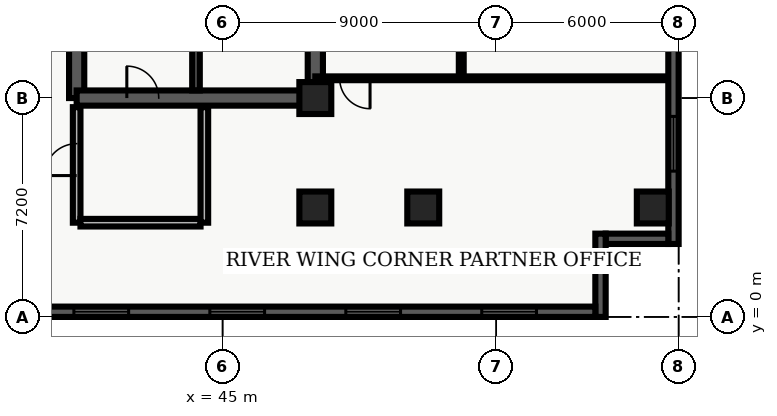
"""IFC4 building model, lengths in metres.
Left out: names, types, materials, properties, quantities, classifications, styles, units other than length and angle.
Written with IfcOpenShell. Run it as: python <this file> out.ifc"""

import sys

from ifc_helpers import new_model, entity, si_unit, converted_unit, direction, frame, origin_with_axes, origin_2d_with_axis, place, context, subcontext, project, spatial, polyline, rectangle, outline, extrude, element, fill, save


model = new_model("IFC4")
c1 = context("Model", 3, precision=1e-05, world=origin_with_axes(), true_north=direction((0.0, 1.0)))
c2 = subcontext(c1, "Body", "Model", "MODEL_VIEW")
j1 = project(units=[si_unit("LENGTHUNIT", "METRE"), converted_unit("PLANEANGLEUNIT", "DEGREE", entity("IfcPlaneAngleMeasure", 0.017), si_unit("PLANEANGLEUNIT", "RADIAN"), dimensions=[0, 0, 0, 0, 0, 0, 0])], contexts=[c1])
p1 = place(None, origin_with_axes())
s1 = spatial("IfcSite", under=j1, at=p1, CompositionType="ELEMENT")
p2 = place(p1, origin_with_axes())
s2 = spatial("IfcBuilding", under=s1, at=p2, CompositionType="ELEMENT")
p3 = place(p2, frame((0.0, 0.0, 179.7), z_axis=(0.0, 0.0, 1.0), x_axis=(1.0, 0.0, 0.0)))
s3 = spatial("IfcBuildingStorey", under=s2, at=p3, CompositionType="ELEMENT", Elevation=179.7)
p4 = place(p3, frame((40.2, 7.2, 0.0), z_axis=(0.0, 0.0, 1.0), x_axis=(0.0, 1.0, 0.0)))
e1 = element("IfcWall", 1, at=p4, inside=s3, PredefinedType="SHEAR", context=c2, shape_type="SweptSolid", body=[
    extrude(outline(polyline([(0.0, -0.25), (15.6, -0.25), (15.6, 0.25), (0.0, 0.25), (0.0, -0.25)])), origin_with_axes(), (0.0, 0.0, 1.0), 3.66),
])
p5 = place(p4, frame((14.475, 0.0, 0.0), z_axis=(0.0, 0.0, 1.0), x_axis=(1.0, 0.0, 0.0)))
e2 = element("IfcOpeningElement", 2, at=p5, cuts=e1, PredefinedType="OPENING", context=c2, shape_type="SweptSolid", body=[
    extrude(rectangle(XDim=1.05, YDim=0.52, at=origin_2d_with_axis()), origin_with_axes(), (0.0, 0.0, 1.0), 2.15),
])
p6 = place(p4, frame((12.75, 0.0, 0.0), z_axis=(0.0, 0.0, 1.0), x_axis=(1.0, 0.0, 0.0)))
e3 = element("IfcOpeningElement", 3, at=p6, cuts=e1, PredefinedType="OPENING", context=c2, shape_type="SweptSolid", body=[
    extrude(rectangle(XDim=1.2, YDim=0.52, at=origin_2d_with_axis()), origin_with_axes(), (0.0, 0.0, 1.0), 2.15),
])
p7 = place(p4, frame((9.3, 0.0, 0.0), z_axis=(0.0, 0.0, 1.0), x_axis=(1.0, 0.0, 0.0)))
e4 = element("IfcOpeningElement", 4, at=p7, cuts=e1, PredefinedType="OPENING", context=c2, shape_type="SweptSolid", body=[
    extrude(rectangle(XDim=0.9, YDim=0.52, at=origin_2d_with_axis()), origin_with_axes(), (0.0, 0.0, 1.0), 2.15),
])
p8 = place(p3, frame((40.2, 7.2, 0.0), z_axis=(0.0, 0.0, 1.0), x_axis=(1.0, 0.0, 0.0)))
e5 = element("IfcWall", 5, at=p8, inside=s3, PredefinedType="SHEAR", context=c2, shape_type="SweptSolid", body=[
    extrude(outline(polyline([(0.0, -0.25), (7.85, -0.25), (7.85, 0.25), (0.0, 0.25), (0.0, -0.25)])), origin_with_axes(), (0.0, 0.0, 1.0), 3.66),
])
p9 = place(p8, frame((2.175, 0.0, 0.0), z_axis=(0.0, 0.0, 1.0), x_axis=(1.0, 0.0, 0.0)))
e6 = element("IfcOpeningElement", 6, at=p9, cuts=e5, PredefinedType="OPENING", context=c2, shape_type="SweptSolid", body=[
    extrude(rectangle(XDim=1.05, YDim=0.52, at=origin_2d_with_axis()), origin_with_axes(), (0.0, 0.0, 1.0), 2.15),
])
p10 = place(p3, frame((48.05, 7.2, 0.0), z_axis=(0.0, 0.0, 1.0), x_axis=(0.0, 1.0, 0.0)))
e7 = element("IfcWall", 7, at=p10, inside=s3, PredefinedType="SHEAR", context=c2, shape_type="SweptSolid", body=[
    extrude(outline(polyline([(0.0, -0.25), (15.6, -0.25), (15.6, 0.25), (0.0, 0.25), (0.0, -0.25)])), origin_with_axes(), (0.0, 0.0, 1.0), 3.66),
])
p11 = place(p10, frame((5.975, 0.0, 0.0), z_axis=(0.0, 0.0, 1.0), x_axis=(1.0, 0.0, 0.0)))
e8 = element("IfcOpeningElement", 8, at=p11, cuts=e7, PredefinedType="OPENING", context=c2, shape_type="SweptSolid", body=[
    extrude(rectangle(XDim=1.05, YDim=0.52, at=origin_2d_with_axis()), origin_with_axes(), (0.0, 0.0, 1.0), 2.15),
])
p12 = place(p10, frame((2.725, 0.0, 0.0), z_axis=(0.0, 0.0, 1.0), x_axis=(1.0, 0.0, 0.0)))
e9 = element("IfcOpeningElement", 9, at=p12, cuts=e7, PredefinedType="OPENING", context=c2, shape_type="SweptSolid", body=[
    extrude(rectangle(XDim=0.95, YDim=0.52, at=origin_2d_with_axis()), origin_with_axes(), (0.0, 0.0, 1.0), 2.15),
])
p13 = place(p3, frame((44.125, 7.45, 0.0), z_axis=(0.0, 0.0, 1.0), x_axis=(0.0, 1.0, 0.0)))
e10 = element("IfcWall", 10, at=p13, inside=s3, PredefinedType="SHEAR", context=c2, shape_type="SweptSolid", body=[
    extrude(outline(polyline([(0.0, -0.125), (15.1, -0.125), (15.1, 0.125), (0.0, 0.125), (0.0, -0.125)])), origin_with_axes(), (0.0, 0.0, 1.0), 3.66),
])
p14 = place(p3, frame((40.2, 3.1, 0.0), z_axis=(0.0, 0.0, 1.0), x_axis=(0.0, 1.0, 0.0)))
e11 = element("IfcWall", 11, at=p14, inside=s3, PredefinedType="SOLIDWALL", context=c2, shape_type="SweptSolid", body=[
    extrude(outline(polyline([(0.0, -0.125), (3.8, -0.125), (3.8, 0.125), (0.0, 0.125), (0.0, -0.125)])), origin_with_axes(), (0.0, 0.0, 1.0), 2.7),
])
p15 = place(p14, frame((2.075, 0.0, 0.0), z_axis=(0.0, 0.0, 1.0), x_axis=(1.0, 0.0, 0.0)))
e12 = element("IfcOpeningElement", 12, at=p15, cuts=e11, PredefinedType="OPENING", context=c2, shape_type="SweptSolid", body=[
    extrude(rectangle(XDim=1.05, YDim=0.27, at=origin_2d_with_axis()), origin_with_axes(), (0.0, 0.0, 1.0), 2.15),
])
p16 = place(p3, frame((40.325, 3.1, 0.0), z_axis=(0.0, 0.0, 1.0), x_axis=(1.0, 0.0, 0.0)))
e13 = element("IfcWall", 13, at=p16, inside=s3, PredefinedType="SOLIDWALL", context=c2, shape_type="SweptSolid", body=[
    extrude(outline(polyline([(0.0, -0.125), (3.95, -0.125), (3.95, 0.125), (0.0, 0.125), (0.0, -0.125)])), origin_with_axes(), (0.0, 0.0, 1.0), 2.7),
])
p17 = place(p3, frame((44.4, 3.1, 0.0), z_axis=(0.0, 0.0, 1.0), x_axis=(0.0, 1.0, 0.0)))
e14 = element("IfcWall", 14, at=p17, inside=s3, PredefinedType="SOLIDWALL", context=c2, shape_type="SweptSolid", body=[
    extrude(outline(polyline([(0.0, -0.125), (3.8, -0.125), (3.8, 0.125), (0.0, 0.125), (0.0, -0.125)])), origin_with_axes(), (0.0, 0.0, 1.0), 2.7),
])
for number, where, z_axis, x_axis in (
    (15, (48.05, 3.6, 0.0), (0.0, 0.0, 1.0), (1.0, 0.0, 0.0)),
    (16, (48.05, 7.2, 0.0), (0.0, 0.0, 1.0), (1.0, 0.0, 0.0)),
    (17, (51.6, 3.6, 0.0), (0.0, 0.0, 1.0), (1.0, 0.0, 0.0)),
    (18, (59.15, 3.6, 0.0), (0.0, 0.0, 1.0), (1.0, 0.0, 0.0)),
):
    element("IfcColumn", number, at=place(p3, frame(where, z_axis=z_axis, x_axis=x_axis)), inside=s3, PredefinedType="COLUMN", context=c2, shape_type="SweptSolid", body=[
        extrude(rectangle(XDim=1.05, YDim=1.05, at=origin_2d_with_axis()), origin_with_axes(), (0.0, 0.0, 1.0), 3.9),
    ])
p18 = place(p3, frame((52.85, 7.85, 0.0), z_axis=(0.0, 0.0, 1.0), x_axis=(0.0, 1.0, 0.0)))
e19 = element("IfcWall", 19, at=p18, inside=s3, PredefinedType="PARTITIONING", context=c2, shape_type="SweptSolid", body=[
    extrude(outline(polyline([(0.0, -0.08), (18.8, -0.08), (18.8, 0.08), (0.0, 0.08), (0.0, -0.08)])), origin_with_axes(), (0.0, 0.0, 1.0), 2.7),
])
p19 = place(p18, frame((4.485, 0.0, 0.0), z_axis=(0.0, 0.0, 1.0), x_axis=(1.0, 0.0, 0.0)))
e20 = element("IfcOpeningElement", 20, at=p19, cuts=e19, PredefinedType="OPENING", context=c2, shape_type="SweptSolid", body=[
    extrude(rectangle(XDim=1.0, YDim=0.18, at=origin_2d_with_axis()), origin_with_axes(), (0.0, 0.0, 1.0), 2.15),
])
p20 = place(p18, frame((7.897, 0.0, 0.0), z_axis=(0.0, 0.0, 1.0), x_axis=(1.0, 0.0, 0.0)))
e21 = element("IfcOpeningElement", 21, at=p20, cuts=e19, PredefinedType="OPENING", context=c2, shape_type="SweptSolid", body=[
    extrude(rectangle(XDim=1.0, YDim=0.18, at=origin_2d_with_axis()), origin_with_axes(), (0.0, 0.0, 1.0), 2.15),
])
p21 = place(p18, frame((11.964, 0.0, 0.0), z_axis=(0.0, 0.0, 1.0), x_axis=(1.0, 0.0, 0.0)))
e22 = element("IfcOpeningElement", 22, at=p21, cuts=e19, PredefinedType="OPENING", context=c2, shape_type="SweptSolid", body=[
    extrude(rectangle(XDim=1.0, YDim=0.18, at=origin_2d_with_axis()), origin_with_axes(), (0.0, 0.0, 1.0), 2.15),
])
p22 = place(p18, frame((18.011, 0.0, 0.0), z_axis=(0.0, 0.0, 1.0), x_axis=(1.0, 0.0, 0.0)))
e23 = element("IfcOpeningElement", 23, at=p22, cuts=e19, PredefinedType="OPENING", context=c2, shape_type="SweptSolid", body=[
    extrude(rectangle(XDim=1.0, YDim=0.18, at=origin_2d_with_axis()), origin_with_axes(), (0.0, 0.0, 1.0), 2.15),
])
p23 = place(p3, frame((59.665, 7.85, 0.0), z_axis=(0.0, 0.0, 1.0), x_axis=(-1.0, 0.0, 0.0)))
e24 = element("IfcWall", 24, at=p23, inside=s3, PredefinedType="PARTITIONING", context=c2, shape_type="SweptSolid", body=[
    extrude(outline(polyline([(0.0, -0.062), (11.615, -0.062), (11.615, 0.062), (0.0, 0.062), (0.0, -0.062)])), origin_with_axes(), (0.0, 0.0, 1.0), 2.7),
])
p24 = place(p23, frame((10.315, 0.0, 0.0), z_axis=(0.0, 0.0, 1.0), x_axis=(1.0, 0.0, 0.0)))
e25 = element("IfcOpeningElement", 25, at=p24, cuts=e24, PredefinedType="OPENING", context=c2, shape_type="SweptSolid", body=[
    extrude(rectangle(XDim=1.0, YDim=0.145, at=origin_2d_with_axis()), origin_with_axes(), (0.0, 0.0, 1.0), 2.15),
])
p25 = place(p3, frame((59.83, 26.06, 0.0), z_axis=(0.0, 0.0, 1.0), x_axis=(0.0, -1.0, 0.0)))
e26 = element("IfcWall", 26, at=p25, inside=s3, PredefinedType="SOLIDWALL", context=c2, shape_type="SweptSolid", body=[
    extrude(outline(polyline([(0.0, -0.17), (23.66, -0.17), (23.66, 0.17), (0.0, 0.17), (0.0, -0.17)])), origin_with_axes(), (0.0, 0.0, 1.0), 3.66),
])
p26 = place(p25, frame((20.364, 0.0, 0.45), z_axis=(0.0, 0.0, 1.0), x_axis=(1.0, 0.0, 0.0)))
e27 = element("IfcOpeningElement", 27, at=p26, cuts=e26, PredefinedType="OPENING", context=c2, shape_type="SweptSolid", body=[
    extrude(rectangle(XDim=1.8, YDim=0.36, at=origin_2d_with_axis()), origin_with_axes(), (0.0, 0.0, 1.0), 2.1),
])
p27 = place(p3, frame((59.66, 2.57, 0.0), z_axis=(0.0, 0.0, 1.0), x_axis=(-1.0, 0.0, 0.0)))
e28 = element("IfcWall", 28, at=p27, inside=s3, PredefinedType="SOLIDWALL", context=c2, shape_type="SweptSolid", body=[
    extrude(outline(polyline([(0.0, -0.17), (2.06, -0.17), (2.06, 0.17), (0.0, 0.17), (0.0, -0.17)])), origin_with_axes(), (0.0, 0.0, 1.0), 3.66),
])
p28 = place(p3, frame((57.43, 2.74, 0.0), z_axis=(0.0, 0.0, 1.0), x_axis=(0.0, -1.0, 0.0)))
e29 = element("IfcWall", 29, at=p28, inside=s3, PredefinedType="SOLIDWALL", context=c2, shape_type="SweptSolid", body=[
    extrude(outline(polyline([(0.0, -0.17), (2.74, -0.17), (2.74, 0.17), (0.0, 0.17), (0.0, -0.17)])), origin_with_axes(), (0.0, 0.0, 1.0), 3.66),
])
p29 = place(p3, frame((57.26, 0.17, 0.0), z_axis=(0.0, 0.0, 1.0), x_axis=(-1.0, 0.0, 0.0)))
e30 = element("IfcWall", 30, at=p29, inside=s3, PredefinedType="SOLIDWALL", context=c2, shape_type="SweptSolid", body=[
    extrude(outline(polyline([(0.0, -0.17), (54.86, -0.17), (54.86, 0.17), (0.0, 0.17), (0.0, -0.17)])), origin_with_axes(), (0.0, 0.0, 1.0), 3.66),
])
p30 = place(p29, frame((2.836, 0.0, 0.45), z_axis=(0.0, 0.0, 1.0), x_axis=(1.0, 0.0, 0.0)))
e31 = element("IfcOpeningElement", 31, at=p30, cuts=e30, PredefinedType="OPENING", context=c2, shape_type="SweptSolid", body=[
    extrude(rectangle(XDim=1.8, YDim=0.36, at=origin_2d_with_axis()), origin_with_axes(), (0.0, 0.0, 1.0), 2.1),
])
p31 = place(p29, frame((7.307, 0.0, 0.45), z_axis=(0.0, 0.0, 1.0), x_axis=(1.0, 0.0, 0.0)))
e32 = element("IfcOpeningElement", 32, at=p31, cuts=e30, PredefinedType="OPENING", context=c2, shape_type="SweptSolid", body=[
    extrude(rectangle(XDim=1.8, YDim=0.36, at=origin_2d_with_axis()), origin_with_axes(), (0.0, 0.0, 1.0), 2.1),
])
p32 = place(p29, frame((11.779, 0.0, 0.45), z_axis=(0.0, 0.0, 1.0), x_axis=(1.0, 0.0, 0.0)))
e33 = element("IfcOpeningElement", 33, at=p32, cuts=e30, PredefinedType="OPENING", context=c2, shape_type="SweptSolid", body=[
    extrude(rectangle(XDim=1.8, YDim=0.36, at=origin_2d_with_axis()), origin_with_axes(), (0.0, 0.0, 1.0), 2.1),
])
p33 = place(p29, frame((16.251, 0.0, 0.45), z_axis=(0.0, 0.0, 1.0), x_axis=(1.0, 0.0, 0.0)))
e34 = element("IfcOpeningElement", 34, at=p33, cuts=e30, PredefinedType="OPENING", context=c2, shape_type="SweptSolid", body=[
    extrude(rectangle(XDim=1.8, YDim=0.36, at=origin_2d_with_axis()), origin_with_axes(), (0.0, 0.0, 1.0), 2.1),
])
p34 = place(p29, frame((20.723, 0.0, 0.45), z_axis=(0.0, 0.0, 1.0), x_axis=(1.0, 0.0, 0.0)))
e35 = element("IfcOpeningElement", 35, at=p34, cuts=e30, PredefinedType="OPENING", context=c2, shape_type="SweptSolid", body=[
    extrude(rectangle(XDim=1.8, YDim=0.36, at=origin_2d_with_axis()), origin_with_axes(), (0.0, 0.0, 1.0), 2.1),
])
p35 = place(p29, frame((34.588, 0.0, 0.45), z_axis=(0.0, 0.0, 1.0), x_axis=(1.0, 0.0, 0.0)))
e36 = element("IfcOpeningElement", 36, at=p35, cuts=e30, PredefinedType="OPENING", context=c2, shape_type="SweptSolid", body=[
    extrude(rectangle(XDim=1.8, YDim=0.36, at=origin_2d_with_axis()), origin_with_axes(), (0.0, 0.0, 1.0), 2.1),
])
p36 = place(p29, frame((38.609, 0.0, 0.45), z_axis=(0.0, 0.0, 1.0), x_axis=(1.0, 0.0, 0.0)))
e37 = element("IfcOpeningElement", 37, at=p36, cuts=e30, PredefinedType="OPENING", context=c2, shape_type="SweptSolid", body=[
    extrude(rectangle(XDim=1.8, YDim=0.36, at=origin_2d_with_axis()), origin_with_axes(), (0.0, 0.0, 1.0), 2.1),
])
p37 = place(p29, frame((43.531, 0.0, 0.45), z_axis=(0.0, 0.0, 1.0), x_axis=(1.0, 0.0, 0.0)))
e38 = element("IfcOpeningElement", 38, at=p37, cuts=e30, PredefinedType="OPENING", context=c2, shape_type="SweptSolid", body=[
    extrude(rectangle(XDim=1.8, YDim=0.36, at=origin_2d_with_axis()), origin_with_axes(), (0.0, 0.0, 1.0), 2.1),
])
p38 = place(p29, frame((47.553, 0.0, 0.45), z_axis=(0.0, 0.0, 1.0), x_axis=(1.0, 0.0, 0.0)))
e39 = element("IfcOpeningElement", 39, at=p38, cuts=e30, PredefinedType="OPENING", context=c2, shape_type="SweptSolid", body=[
    extrude(rectangle(XDim=1.8, YDim=0.36, at=origin_2d_with_axis()), origin_with_axes(), (0.0, 0.0, 1.0), 2.1),
])
p39 = place(p29, frame((52.474, 0.0, 0.45), z_axis=(0.0, 0.0, 1.0), x_axis=(1.0, 0.0, 0.0)))
e40 = element("IfcOpeningElement", 40, at=p39, cuts=e30, PredefinedType="OPENING", context=c2, shape_type="SweptSolid", body=[
    extrude(rectangle(XDim=1.8, YDim=0.36, at=origin_2d_with_axis()), origin_with_axes(), (0.0, 0.0, 1.0), 2.1),
])
p40 = place(p8, frame((2.175, 0.0, 0.0), z_axis=(0.0, 0.0, 1.0), x_axis=(1.0, 0.0, 0.0)))
e41 = element("IfcDoor", 41, at=p40, inside=s3, OperationType="SINGLE_SWING_LEFT", PredefinedType="DOOR", context=c2, shape_type="SweptSolid", body=[
    extrude(rectangle(XDim=1.05, YDim=0.09, at=origin_2d_with_axis()), origin_with_axes(), (0.0, 0.0, 1.0), 2.15),
])
fill(e6, e41)
p41 = place(p14, frame((2.075, 0.0, 0.0), z_axis=(0.0, 0.0, 1.0), x_axis=(1.0, 0.0, 0.0)))
e42 = element("IfcDoor", 42, at=p41, inside=s3, OperationType="SINGLE_SWING_LEFT", PredefinedType="DOOR", context=c2, shape_type="SweptSolid", body=[
    extrude(rectangle(XDim=1.05, YDim=0.09, at=origin_2d_with_axis()), origin_with_axes(), (0.0, 0.0, 1.0), 2.15),
])
fill(e12, e42)
p42 = place(p23, frame((10.315, 0.0, 0.0), z_axis=(0.0, 0.0, 1.0), x_axis=(1.0, 0.0, 0.0)))
e43 = element("IfcDoor", 43, at=p42, inside=s3, OperationType="SINGLE_SWING_LEFT", PredefinedType="DOOR", context=c2, shape_type="SweptSolid", body=[
    extrude(rectangle(XDim=1.0, YDim=0.075, at=origin_2d_with_axis()), origin_with_axes(), (0.0, 0.0, 1.0), 2.15),
])
fill(e25, e43)
p43 = place(p25, frame((20.364, 0.0, 0.45), z_axis=(0.0, 0.0, 1.0), x_axis=(1.0, 0.0, 0.0)))
e44 = element("IfcWindow", 44, at=p43, inside=s3, PredefinedType="WINDOW", context=c2, shape_type="SweptSolid", body=[
    extrude(rectangle(XDim=1.8, YDim=0.09, at=origin_2d_with_axis()), origin_with_axes(), (0.0, 0.0, 1.0), 2.1),
])
fill(e27, e44)
p44 = place(p29, frame((2.836, 0.0, 0.45), z_axis=(0.0, 0.0, 1.0), x_axis=(1.0, 0.0, 0.0)))
e45 = element("IfcWindow", 45, at=p44, inside=s3, PredefinedType="WINDOW", context=c2, shape_type="SweptSolid", body=[
    extrude(rectangle(XDim=1.8, YDim=0.09, at=origin_2d_with_axis()), origin_with_axes(), (0.0, 0.0, 1.0), 2.1),
])
fill(e31, e45)
p45 = place(p29, frame((7.307, 0.0, 0.45), z_axis=(0.0, 0.0, 1.0), x_axis=(1.0, 0.0, 0.0)))
e46 = element("IfcWindow", 46, at=p45, inside=s3, PredefinedType="WINDOW", context=c2, shape_type="SweptSolid", body=[
    extrude(rectangle(XDim=1.8, YDim=0.09, at=origin_2d_with_axis()), origin_with_axes(), (0.0, 0.0, 1.0), 2.1),
])
fill(e32, e46)
p46 = place(p29, frame((11.779, 0.0, 0.45), z_axis=(0.0, 0.0, 1.0), x_axis=(1.0, 0.0, 0.0)))
e47 = element("IfcWindow", 47, at=p46, inside=s3, PredefinedType="WINDOW", context=c2, shape_type="SweptSolid", body=[
    extrude(rectangle(XDim=1.8, YDim=0.09, at=origin_2d_with_axis()), origin_with_axes(), (0.0, 0.0, 1.0), 2.1),
])
fill(e33, e47)
p47 = place(p29, frame((16.251, 0.0, 0.45), z_axis=(0.0, 0.0, 1.0), x_axis=(1.0, 0.0, 0.0)))
e48 = element("IfcWindow", 48, at=p47, inside=s3, PredefinedType="WINDOW", context=c2, shape_type="SweptSolid", body=[
    extrude(rectangle(XDim=1.8, YDim=0.09, at=origin_2d_with_axis()), origin_with_axes(), (0.0, 0.0, 1.0), 2.1),
])
fill(e34, e48)
save(model, sys.argv[1])
